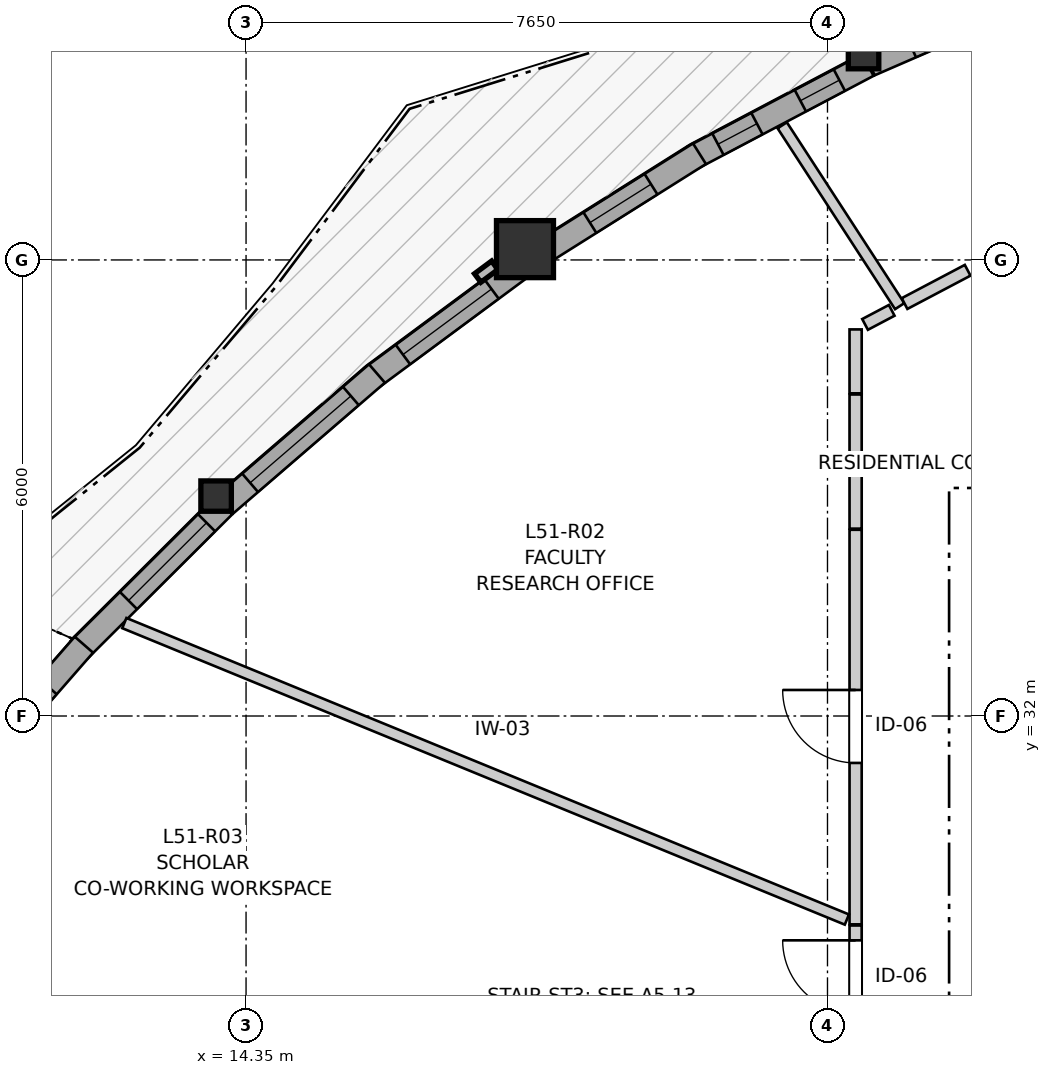
"""IFC4 building model, lengths in metres.
Left out: names, types, materials, properties, quantities, classifications, styles, units other than length and angle.
Written with IfcOpenShell. Run it as: python <this file> out.ifc"""

import sys

from ifc_helpers import new_model, si_unit, direction, frame, frame_2d, origin, origin_2d, place, context, subcontext, project, spatial, rectangle, i_section, extrude, source, transform, mapped, element, fill, save


model = new_model("IFC4")
c1 = context("Model", 3, precision=1e-05, world=origin(), true_north=direction((0.0, 1.0)))
c2 = subcontext(c1, "Body", "Model", "MODEL_VIEW")
j1 = project(units=[si_unit("LENGTHUNIT", "METRE"), si_unit("PLANEANGLEUNIT", "RADIAN")], contexts=[c1])
p1 = place(None, origin())
s1 = spatial("IfcSite", under=j1, at=p1, CompositionType="ELEMENT")
p2 = place(p1, origin())
s2 = spatial("IfcBuilding", under=s1, at=p2, CompositionType="ELEMENT")
p3 = place(p2, frame((0.0, 0.0, 171.4)))
s3 = spatial("IfcBuildingStorey", under=s2, at=p3, CompositionType="ELEMENT", Elevation=171.4)
m1 = source(origin(), c2, "Body", "SweptSolid", [
    extrude(i_section(OverallWidth=0.401, OverallDepth=0.399, WebThickness=0.023, FlangeThickness=0.036, FilletRadius=0.015, at=origin_2d()), origin(), (0.0, 0.0, 1.0), 2.95),
])
p4 = place(p3, frame((22.475, 40.714, 0.0), z_axis=(0.0, 0.0, 1.0), x_axis=(1.0, 0.0, 0.0)))
e1 = element("IfcColumn", 1, at=p4, inside=s3, PredefinedType="PILASTER", context=c2, shape_type="MappedRepresentation", body=[
    mapped(m1, transform((0.0, 0.0, 0.0), x_axis=(1.0, 0.0, 0.0), y_axis=(0.0, 1.0, 0.0), z_axis=(0.0, 0.0, 1.0), scale=1.0)),
])
m2 = source(origin(), c2, "Body", "SweptSolid", [
    extrude(rectangle(XDim=0.75, YDim=0.75, at=origin_2d()), origin(), (0.0, 0.0, 1.0), 2.95),
])
p5 = place(p3, frame((18.02, 38.142, 0.0), z_axis=(0.0, 0.0, 1.0), x_axis=(1.0, 0.0, 0.0)))
e2 = element("IfcColumn", 2, at=p5, inside=s3, PredefinedType="COLUMN", context=c2, shape_type="MappedRepresentation", body=[
    mapped(m2, transform((0.0, 0.0, 0.0), x_axis=(1.0, 0.0, 0.0), y_axis=(0.0, 1.0, 0.0), z_axis=(0.0, 0.0, 1.0), scale=1.0)),
])
p6 = place(p3, frame((13.956, 34.893, 0.0), z_axis=(0.0, 0.0, 1.0), x_axis=(1.0, 0.0, 0.0)))
e3 = element("IfcColumn", 3, at=p6, inside=s3, PredefinedType="PILASTER", context=c2, shape_type="MappedRepresentation", body=[
    mapped(m1, transform((0.0, 0.0, 0.0), x_axis=(1.0, 0.0, 0.0), y_axis=(0.0, 1.0, 0.0), z_axis=(0.0, 0.0, 1.0), scale=1.0)),
])
p7 = place(p3, frame((24.947, 41.615, 0.0), z_axis=(0.0, 0.0, 1.0), x_axis=(-0.9171028146, -0.398650758752, 0.0)))
e4 = element("IfcWall", 4, at=p7, inside=s3, PredefinedType="SOLIDWALL", context=c2, shape_type="SweptSolid", body=[
    extrude(rectangle(XDim=2.606, YDim=0.32, at=frame_2d((1.303, 0.0))), origin(), (0.0, 0.0, 1.0), 2.53),
])
p8 = place(p7, frame((0.613, 0.0, 0.82)))
e5 = element("IfcOpeningElement", 5, at=p8, cuts=e4, PredefinedType="OPENING", context=c2, shape_type="SweptSolid", body=[
    extrude(rectangle(XDim=1.4, YDim=1.35, at=frame_2d((0.7, 0.675))), frame((0.0, 0.17, 0.0), z_axis=(0.0, -1.0, 0.0), x_axis=(1.0, 0.0, 0.0)), (0.0, 0.0, 1.0), 0.34),
])
p9 = place(p3, frame((22.531, 40.563, 0.0), z_axis=(0.0, 0.0, 1.0), x_axis=(-0.884376111278, -0.466774992691, 0.0)))
e6 = element("IfcWall", 6, at=p9, inside=s3, PredefinedType="SOLIDWALL", context=c2, shape_type="SweptSolid", body=[
    extrude(rectangle(XDim=2.592, YDim=0.32, at=frame_2d((1.296, 0.0))), origin(), (0.0, 0.0, 1.0), 2.53),
])
p10 = place(p9, frame((0.424, 0.0, 0.82)))
e7 = element("IfcOpeningElement", 7, at=p10, cuts=e6, PredefinedType="OPENING", context=c2, shape_type="SweptSolid", body=[
    extrude(rectangle(XDim=0.58, YDim=1.35, at=frame_2d((0.29, 0.675))), frame((0.0, 0.17, 0.0), z_axis=(0.0, -1.0, 0.0), x_axis=(1.0, 0.0, 0.0)), (0.0, 0.0, 1.0), 0.34),
])
p11 = place(p9, frame((1.65, 0.0, 0.82)))
e8 = element("IfcOpeningElement", 8, at=p11, cuts=e6, PredefinedType="OPENING", context=c2, shape_type="SweptSolid", body=[
    extrude(rectangle(XDim=0.58, YDim=1.35, at=frame_2d((0.29, 0.675))), frame((0.0, 0.17, 0.0), z_axis=(0.0, -1.0, 0.0), x_axis=(1.0, 0.0, 0.0)), (0.0, 0.0, 1.0), 0.34),
])
p12 = place(p3, frame((20.316, 39.398, 0.0), z_axis=(0.0, 0.0, 1.0), x_axis=(-0.846391108811, -0.532561818878, 0.0)))
e9 = element("IfcWall", 9, at=p12, inside=s3, PredefinedType="SOLIDWALL", context=c2, shape_type="SweptSolid", body=[
    extrude(rectangle(XDim=2.447, YDim=0.32, at=frame_2d((1.223, 0.0))), origin(), (0.0, 0.0, 1.0), 2.53),
])
p13 = place(p12, frame((0.753, 0.0, 0.82)))
e10 = element("IfcOpeningElement", 10, at=p13, cuts=e9, PredefinedType="OPENING", context=c2, shape_type="SweptSolid", body=[
    extrude(rectangle(XDim=0.95, YDim=1.35, at=frame_2d((0.475, 0.675))), frame((0.0, 0.17, 0.0), z_axis=(0.0, -1.0, 0.0), x_axis=(1.0, 0.0, 0.0)), (0.0, 0.0, 1.0), 0.34),
])
p14 = place(p3, frame((17.982, 37.916, 0.0), z_axis=(0.0, 0.0, 1.0), x_axis=(-0.803827672273, -0.594862230511, 0.0)))
e11 = element("IfcWall", 11, at=p14, inside=s3, PredefinedType="SOLIDWALL", context=c2, shape_type="SweptSolid", body=[
    extrude(rectangle(XDim=2.462, YDim=0.32, at=frame_2d((1.231, 0.0))), origin(), (0.0, 0.0, 1.0), 2.53),
])
p15 = place(p14, frame((0.501, 0.0, 0.82)))
e12 = element("IfcOpeningElement", 12, at=p15, cuts=e11, PredefinedType="OPENING", context=c2, shape_type="SweptSolid", body=[
    extrude(rectangle(XDim=1.45, YDim=1.25, at=frame_2d((0.725, 0.625))), frame((0.0, 0.17, 0.0), z_axis=(0.0, -1.0, 0.0), x_axis=(1.0, 0.0, 0.0)), (0.0, 0.0, 1.0), 0.34),
])
p16 = place(p3, frame((16.072, 36.506, 0.0), z_axis=(0.0, 0.0, 1.0), x_axis=(-0.757455764876, -0.652886486502, 0.0)))
e13 = element("IfcWall", 13, at=p16, inside=s3, PredefinedType="SOLIDWALL", context=c2, shape_type="SweptSolid", body=[
    extrude(rectangle(XDim=2.636, YDim=0.32, at=frame_2d((1.318, 0.0))), origin(), (0.0, 0.0, 1.0), 2.53),
])
p17 = place(p16, frame((0.453, 0.0, 0.82)))
e14 = element("IfcOpeningElement", 14, at=p17, cuts=e13, PredefinedType="OPENING", context=c2, shape_type="SweptSolid", body=[
    extrude(rectangle(XDim=1.75, YDim=1.3, at=frame_2d((0.875, 0.65))), frame((0.0, 0.17, 0.0), z_axis=(0.0, -1.0, 0.0), x_axis=(1.0, 0.0, 0.0)), (0.0, 0.0, 1.0), 0.34),
])
p18 = place(p3, frame((14.055, 34.766, 0.0), z_axis=(0.0, 0.0, 1.0), x_axis=(-0.708335777277, -0.705875645301, 0.0)))
e15 = element("IfcWall", 15, at=p18, inside=s3, PredefinedType="SOLIDWALL", context=c2, shape_type="SweptSolid", body=[
    extrude(rectangle(XDim=2.679, YDim=0.32, at=frame_2d((1.34, 0.0))), origin(), (0.0, 0.0, 1.0), 2.53),
])
p19 = place(p18, frame((0.317, 0.0, 0.82)))
e16 = element("IfcOpeningElement", 16, at=p19, cuts=e15, PredefinedType="OPENING", context=c2, shape_type="SweptSolid", body=[
    extrude(rectangle(XDim=1.45, YDim=1.25, at=frame_2d((0.725, 0.625))), frame((0.0, 0.17, 0.0), z_axis=(0.0, -1.0, 0.0), x_axis=(1.0, 0.0, 0.0)), (0.0, 0.0, 1.0), 0.34),
])
p20 = place(p3, frame((12.216, 32.938, 0.0), z_axis=(0.0, 0.0, 1.0), x_axis=(-0.657623701515, -0.753346578412, 0.0)))
e17 = element("IfcWall", 17, at=p20, inside=s3, PredefinedType="SOLIDWALL", context=c2, shape_type="SweptSolid", body=[
    extrude(rectangle(XDim=2.591, YDim=0.32, at=frame_2d((1.296, 0.0))), origin(), (0.0, 0.0, 1.0), 2.53),
])
p21 = place(p20, frame((0.726, 0.0, 0.82)))
e18 = element("IfcOpeningElement", 18, at=p21, cuts=e17, PredefinedType="OPENING", context=c2, shape_type="SweptSolid", body=[
    extrude(rectangle(XDim=1.15, YDim=1.2, at=frame_2d((0.575, 0.6))), frame((0.0, 0.17, 0.0), z_axis=(0.0, -1.0, 0.0), x_axis=(1.0, 0.0, 0.0)), (0.0, 0.0, 1.0), 0.34),
])
p22 = place(p3, frame((22.37, 29.259, 0.0), z_axis=(0.0, 0.0, 1.0), x_axis=(0.0, 1.0, 0.0)))
e19 = element("IfcWall", 19, at=p22, inside=s3, PredefinedType="PARTITIONING", context=c2, shape_type="SweptSolid", body=[
    extrude(rectangle(XDim=5.191, YDim=0.16, at=frame_2d((2.595, 0.0))), origin(), (0.0, 0.0, 1.0), 2.95),
])
p23 = place(p22, frame((2.124, 0.0, 0.0)))
e20 = element("IfcOpeningElement", 20, at=p23, cuts=e19, PredefinedType="OPENING", context=c2, shape_type="SweptSolid", body=[
    extrude(rectangle(XDim=0.96, YDim=2.1, at=frame_2d((0.48, 1.05))), frame((0.0, 0.09, 0.0), z_axis=(0.0, -1.0, 0.0), x_axis=(1.0, 0.0, 0.0)), (0.0, 0.0, 1.0), 0.18),
])
p24 = place(p3, frame((22.37, 27.85, 0.0), z_axis=(0.0, 0.0, 1.0), x_axis=(0.0, 1.0, 0.0)))
e21 = element("IfcWall", 21, at=p24, inside=s3, PredefinedType="PARTITIONING", context=c2, shape_type="SweptSolid", body=[
    extrude(rectangle(XDim=1.394, YDim=0.16, at=frame_2d((0.697, 0.0))), origin(), (0.0, 0.0, 1.0), 2.95),
])
p25 = place(p24, frame((0.239, 0.0, 0.0)))
e22 = element("IfcOpeningElement", 22, at=p25, cuts=e21, PredefinedType="OPENING", context=c2, shape_type="SweptSolid", body=[
    extrude(rectangle(XDim=0.96, YDim=2.1, at=frame_2d((0.48, 1.05))), frame((0.0, 0.09, 0.0), z_axis=(0.0, -1.0, 0.0), x_axis=(1.0, 0.0, 0.0)), (0.0, 0.0, 1.0), 0.18),
])
p26 = place(p3, frame((12.749, 33.223, 0.0), z_axis=(0.0, 0.0, 1.0), x_axis=(0.925160061079, -0.379577213996, 0.0)))
e23 = element("IfcWall", 23, at=p26, inside=s3, PredefinedType="PARTITIONING", context=c2, shape_type="SweptSolid", body=[
    extrude(rectangle(XDim=10.276, YDim=0.145, at=frame_2d((5.138, 0.0))), origin(), (0.0, 0.0, 1.0), 2.95),
])
p27 = place(p3, frame((21.405, 39.771, 0.0), z_axis=(0.0, 0.0, 1.0), x_axis=(0.544731217197, -0.838610696933, 0.0)))
e24 = element("IfcWall", 24, at=p27, inside=s3, PredefinedType="PARTITIONING", context=c2, shape_type="SweptSolid", body=[
    extrude(rectangle(XDim=2.837, YDim=0.145, at=frame_2d((1.418, 0.0))), origin(), (0.0, 0.0, 1.0), 2.95),
])
p28 = place(p3, frame((22.37, 34.465, 0.0), z_axis=(0.0, 0.0, 1.0), x_axis=(0.0, 1.0, 0.0)))
e25 = element("IfcWall", 25, at=p28, inside=s3, PredefinedType="PARTITIONING", context=c2, shape_type="SweptSolid", body=[
    extrude(rectangle(XDim=1.765, YDim=0.16, at=frame_2d((0.882, 0.0))), origin(), (0.0, 0.0, 1.0), 2.95),
])
p29 = place(p3, frame((23.014, 37.426, 0.0), z_axis=(0.0, 0.0, 1.0), x_axis=(0.884432472224, 0.466668192697, 0.0)))
e26 = element("IfcWall", 26, at=p29, inside=s3, PredefinedType="PARTITIONING", context=c2, shape_type="SweptSolid", body=[
    extrude(rectangle(XDim=0.938, YDim=0.16, at=frame_2d((0.469, 0.0))), origin(), (0.0, 0.0, 1.0), 2.558),
])
p30 = place(p3, frame((22.37, 36.245, 0.0), z_axis=(0.0, 0.0, 1.0), x_axis=(0.0, 1.0, 0.0)))
e27 = element("IfcWall", 27, at=p30, inside=s3, PredefinedType="PARTITIONING", context=c2, shape_type="SweptSolid", body=[
    extrude(rectangle(XDim=0.841, YDim=0.16, at=frame_2d((0.42, 0.0))), origin(), (0.0, 0.0, 1.0), 2.95),
])
p31 = place(p3, frame((22.494, 37.152, 0.0), z_axis=(0.0, 0.0, 1.0), x_axis=(0.884356504768, 0.466812138311, 0.0)))
e28 = element("IfcWall", 28, at=p31, inside=s3, PredefinedType="PARTITIONING", context=c2, shape_type="SweptSolid", body=[
    extrude(rectangle(XDim=0.396, YDim=0.16, at=frame_2d((0.198, 0.0))), origin(), (0.0, 0.0, 1.0), 2.558),
])
m3 = source(origin(), c2, "Body", "SweptSolid", [
    extrude(rectangle(XDim=0.58, YDim=1.35, at=frame_2d((0.29, 0.675))), frame((0.0, 0.03, 0.0), z_axis=(0.0, -1.0, 0.0), x_axis=(1.0, 0.0, 0.0)), (0.0, 0.0, 1.0), 0.06),
])
p32 = place(p10, origin())
e29 = element("IfcWindow", 29, at=p32, inside=s3, PartitioningType="SINGLE_PANEL", PredefinedType="WINDOW", context=c2, shape_type="MappedRepresentation", body=[
    mapped(m3, transform((0.0, 0.0, 0.0), x_axis=(1.0, 0.0, 0.0), y_axis=(0.0, 1.0, 0.0), z_axis=(0.0, 0.0, 1.0), scale=1.0)),
])
fill(e7, e29)
p33 = place(p11, origin())
e30 = element("IfcWindow", 30, at=p33, inside=s3, PartitioningType="SINGLE_PANEL", PredefinedType="WINDOW", context=c2, shape_type="MappedRepresentation", body=[
    mapped(m3, transform((0.0, 0.0, 0.0), x_axis=(1.0, 0.0, 0.0), y_axis=(0.0, 1.0, 0.0), z_axis=(0.0, 0.0, 1.0), scale=1.0)),
])
fill(e8, e30)
m4 = source(origin(), c2, "Body", "SweptSolid", [
    extrude(rectangle(XDim=0.95, YDim=1.35, at=frame_2d((0.475, 0.675))), frame((0.0, 0.03, 0.0), z_axis=(0.0, -1.0, 0.0), x_axis=(1.0, 0.0, 0.0)), (0.0, 0.0, 1.0), 0.06),
])
p34 = place(p13, origin())
e31 = element("IfcWindow", 31, at=p34, inside=s3, PartitioningType="SINGLE_PANEL", PredefinedType="WINDOW", context=c2, shape_type="MappedRepresentation", body=[
    mapped(m4, transform((0.0, 0.0, 0.0), x_axis=(1.0, 0.0, 0.0), y_axis=(0.0, 1.0, 0.0), z_axis=(0.0, 0.0, 1.0), scale=1.0)),
])
fill(e10, e31)
m5 = source(origin(), c2, "Body", "SweptSolid", [
    extrude(rectangle(XDim=1.45, YDim=1.25, at=frame_2d((0.725, 0.625))), frame((0.0, 0.03, 0.0), z_axis=(0.0, -1.0, 0.0), x_axis=(1.0, 0.0, 0.0)), (0.0, 0.0, 1.0), 0.06),
])
p35 = place(p15, origin())
e32 = element("IfcWindow", 32, at=p35, inside=s3, PartitioningType="SINGLE_PANEL", PredefinedType="WINDOW", context=c2, shape_type="MappedRepresentation", body=[
    mapped(m5, transform((0.0, 0.0, 0.0), x_axis=(1.0, 0.0, 0.0), y_axis=(0.0, 1.0, 0.0), z_axis=(0.0, 0.0, 1.0), scale=1.0)),
])
fill(e12, e32)
m6 = source(origin(), c2, "Body", "SweptSolid", [
    extrude(rectangle(XDim=1.75, YDim=1.3, at=frame_2d((0.875, 0.65))), frame((0.0, 0.03, 0.0), z_axis=(0.0, -1.0, 0.0), x_axis=(1.0, 0.0, 0.0)), (0.0, 0.0, 1.0), 0.06),
])
p36 = place(p17, origin())
e33 = element("IfcWindow", 33, at=p36, inside=s3, PartitioningType="SINGLE_PANEL", PredefinedType="WINDOW", context=c2, shape_type="MappedRepresentation", body=[
    mapped(m6, transform((0.0, 0.0, 0.0), x_axis=(1.0, 0.0, 0.0), y_axis=(0.0, 1.0, 0.0), z_axis=(0.0, 0.0, 1.0), scale=1.0)),
])
fill(e14, e33)
p37 = place(p19, origin())
e34 = element("IfcWindow", 34, at=p37, inside=s3, PartitioningType="SINGLE_PANEL", PredefinedType="WINDOW", context=c2, shape_type="MappedRepresentation", body=[
    mapped(m5, transform((0.0, 0.0, 0.0), x_axis=(1.0, 0.0, 0.0), y_axis=(0.0, 1.0, 0.0), z_axis=(0.0, 0.0, 1.0), scale=1.0)),
])
fill(e16, e34)
m7 = source(origin(), c2, "Body", "SweptSolid", [
    extrude(rectangle(XDim=0.96, YDim=2.1, at=frame_2d((0.48, 1.05))), frame((0.0, 0.025, 0.0), z_axis=(0.0, -1.0, 0.0), x_axis=(1.0, 0.0, 0.0)), (0.0, 0.0, 1.0), 0.05),
])
p38 = place(p23, origin())
e35 = element("IfcDoor", 35, at=p38, inside=s3, OperationType="SINGLE_SWING_RIGHT", PredefinedType="DOOR", context=c2, shape_type="MappedRepresentation", body=[
    mapped(m7, transform((0.0, 0.0, 0.0), x_axis=(1.0, 0.0, 0.0), y_axis=(0.0, 1.0, 0.0), z_axis=(0.0, 0.0, 1.0), scale=1.0)),
])
fill(e20, e35)
p39 = place(p25, origin())
e36 = element("IfcDoor", 36, at=p39, inside=s3, OperationType="SINGLE_SWING_RIGHT", PredefinedType="DOOR", context=c2, shape_type="MappedRepresentation", body=[
    mapped(m7, transform((0.0, 0.0, 0.0), x_axis=(1.0, 0.0, 0.0), y_axis=(0.0, 1.0, 0.0), z_axis=(0.0, 0.0, 1.0), scale=1.0)),
])
fill(e22, e36)
save(model, sys.argv[1])
